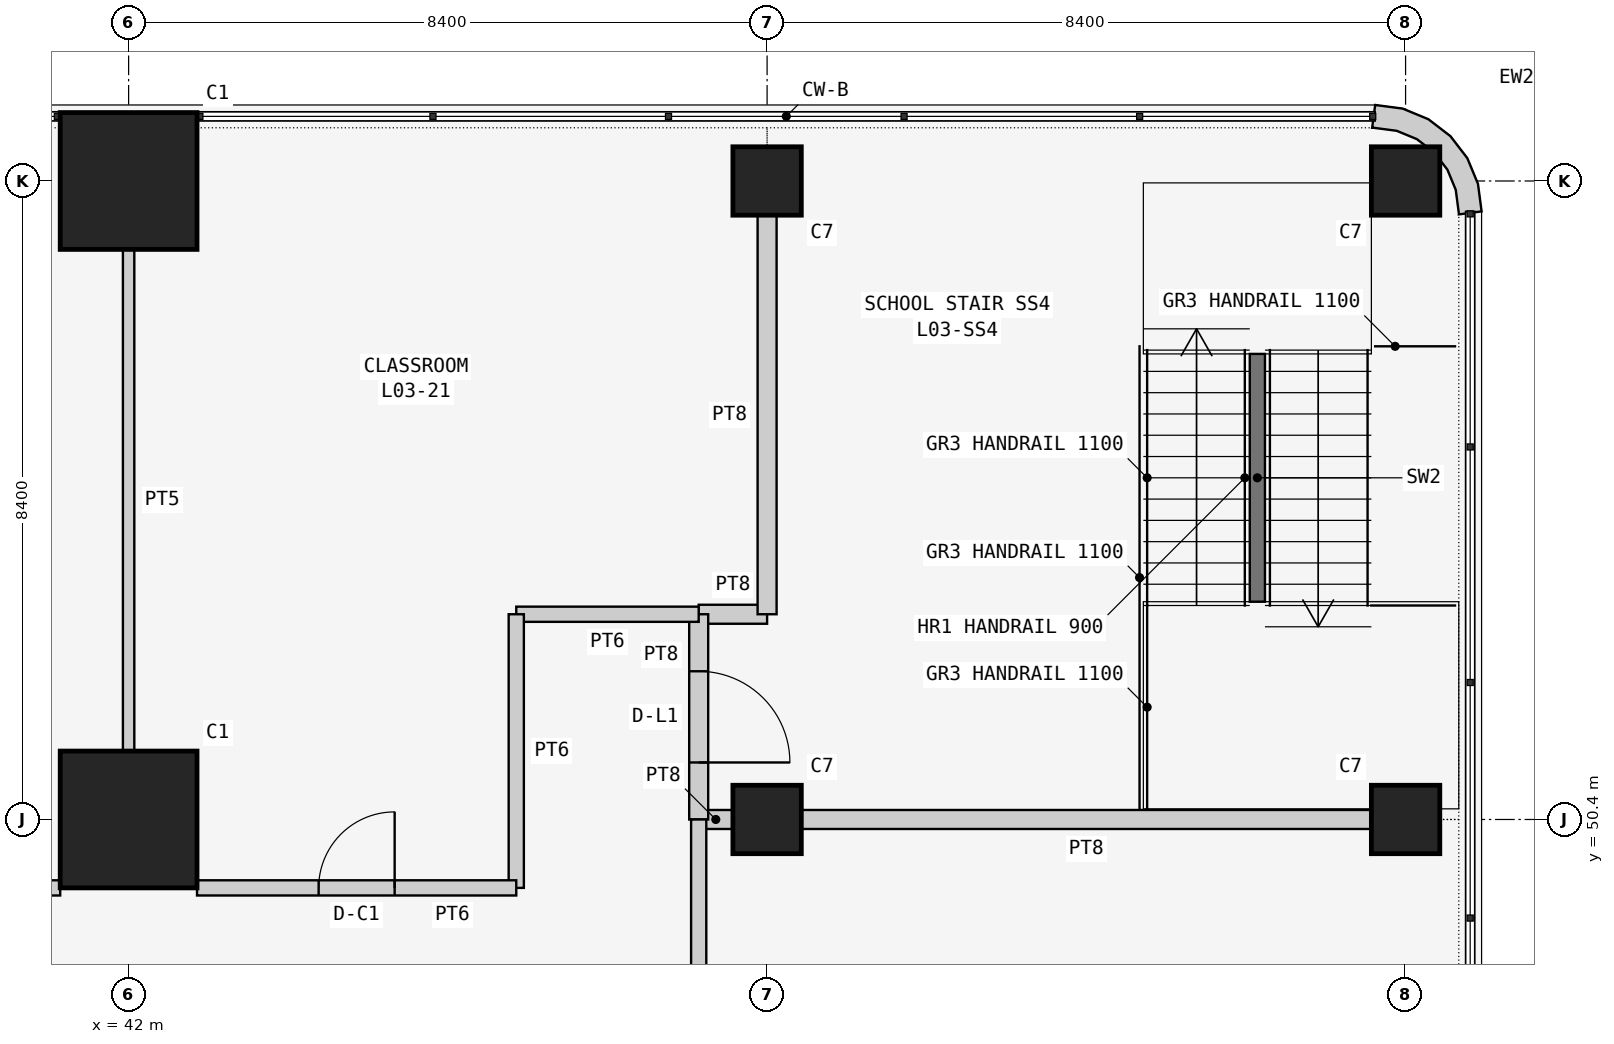
"""IFC4 building model, lengths in metres.
Left out: names, types, materials, properties, quantities, classifications, styles, units other than length and angle.
Written with IfcOpenShell. Run it as: python <this file> out.ifc"""

import sys

from ifc_helpers import new_model, si_unit, direction, frame, frame_2d, origin, origin_2d, place, context, subcontext, project, spatial, polyline, rectangle, outline, extrude, element, fill, save


model = new_model("IFC4")
c1 = context("Model", 3, precision=1e-05, world=origin(), true_north=direction((0.0, 1.0)))
c2 = subcontext(c1, "Body", "Model", "MODEL_VIEW")
j1 = project(units=[si_unit("LENGTHUNIT", "METRE"), si_unit("PLANEANGLEUNIT", "RADIAN")], contexts=[c1])
p1 = place(None, origin())
s1 = spatial("IfcSite", under=j1, at=p1, CompositionType="ELEMENT")
p2 = place(p1, origin())
s2 = spatial("IfcBuilding", under=s1, at=p2, CompositionType="ELEMENT")
p3 = place(p2, frame((0.0, 0.0, 15.0)))
s3 = spatial("IfcBuildingStorey", under=s2, at=p3, CompositionType="ELEMENT", Elevation=15.0)
for number, where, z_axis, x_axis in (
    (1, (42.0, 50.4, 0.0), (0.0, 0.0, 1.0), (1.0, 0.0, 0.0)),
    (2, (42.0, 58.8, 0.0), (0.0, 0.0, 1.0), (1.0, 0.0, 0.0)),
):
    element("IfcColumn", number, at=place(p3, frame(where, z_axis=z_axis, x_axis=x_axis)), inside=s3, PredefinedType="COLUMN", context=c2, shape_type="SweptSolid", body=[
        extrude(rectangle(XDim=1.8, YDim=1.8, at=origin_2d()), origin(), (0.0, 0.0, 1.0), 4.5),
    ])
for number, where, z_axis, x_axis in (
    (3, (50.4, 50.4, 0.0), (0.0, 0.0, 1.0), (1.0, 0.0, 0.0)),
    (4, (50.4, 58.8, 0.0), (0.0, 0.0, 1.0), (1.0, 0.0, 0.0)),
    (5, (58.8, 50.4, 0.0), (0.0, 0.0, 1.0), (1.0, 0.0, 0.0)),
    (6, (58.8, 58.8, 0.0), (0.0, 0.0, 1.0), (1.0, 0.0, 0.0)),
):
    element("IfcColumn", number, at=place(p3, frame(where, z_axis=z_axis, x_axis=x_axis)), inside=s3, PredefinedType="COLUMN", context=c2, shape_type="SweptSolid", body=[
        extrude(rectangle(XDim=0.9, YDim=0.9, at=origin_2d()), origin(), (0.0, 0.0, 1.0), 4.5),
    ])
p4 = place(p3, frame((59.648, 58.355, 0.0), z_axis=(0.0, 0.0, 1.0), x_axis=(0.707106781187, 0.707106781187, 0.0)))
e7 = element("IfcWall", 7, at=p4, inside=s3, PredefinedType="SOLIDWALL", context=c2, shape_type="SweptSolid", body=[
    extrude(outline(polyline([(0.139, 1.904), (-0.101, 1.72), (-0.087, 1.706), (0.1, 1.463), (0.209, 1.198), (0.246, 0.914), (0.209, 0.63), (0.1, 0.365), (-0.087, 0.122), (-0.101, 0.108), (0.139, -0.076), (0.362, 0.214), (0.502, 0.552), (0.549, 0.914), (0.502, 1.276), (0.362, 1.614), (0.139, 1.904)])), origin(), (0.0, 0.0, 1.0), 4.3),
])
p5 = place(p3, frame((49.95, 50.4, 0.0), z_axis=(0.0, 0.0, 1.0), x_axis=(-1.0, 0.0, 0.0)))
e8 = element("IfcWall", 8, at=p5, inside=s3, PredefinedType="SOLIDWALL", context=c2, shape_type="SweptSolid", body=[
    extrude(rectangle(XDim=0.45, YDim=0.25, at=frame_2d((0.225, 0.0))), origin(), (0.0, 0.0, 1.0), 3.543),
])
p6 = place(p3, frame((58.35, 50.4, 0.0), z_axis=(0.0, 0.0, 1.0), x_axis=(-1.0, 0.0, 0.0)))
e9 = element("IfcWall", 9, at=p6, inside=s3, PredefinedType="SOLIDWALL", context=c2, shape_type="SweptSolid", body=[
    extrude(rectangle(XDim=7.5, YDim=0.25, at=frame_2d((3.75, 0.0))), origin(), (0.0, 0.0, 1.0), 3.543),
])
p7 = place(p3, frame((49.5, 53.1, 0.0), z_axis=(0.0, 0.0, 1.0), x_axis=(1.0, 0.0, 0.0)))
e10 = element("IfcWall", 10, at=p7, inside=s3, PredefinedType="SOLIDWALL", context=c2, shape_type="SweptSolid", body=[
    extrude(rectangle(XDim=0.9, YDim=0.25, at=frame_2d((0.45, 0.0))), origin(), (0.0, 0.0, 1.0), 4.3),
])
p8 = place(p3, frame((50.4, 53.1, 0.0), z_axis=(0.0, 0.0, 1.0), x_axis=(0.0, 1.0, 0.0)))
e11 = element("IfcWall", 11, at=p8, inside=s3, PredefinedType="SOLIDWALL", context=c2, shape_type="SweptSolid", body=[
    extrude(rectangle(XDim=5.25, YDim=0.25, at=frame_2d((2.625, 0.0))), origin(), (0.0, 0.0, 1.0), 3.543),
])
p9 = place(p3, frame((49.5, 50.4, 0.0), z_axis=(0.0, 0.0, 1.0), x_axis=(0.0, 1.0, 0.0)))
e12 = element("IfcWall", 12, at=p9, inside=s3, PredefinedType="SOLIDWALL", context=c2, shape_type="SweptSolid", body=[
    extrude(rectangle(XDim=2.7, YDim=0.25, at=frame_2d((1.35, 0.0))), origin(), (0.0, 0.0, 1.0), 4.3),
])
p10 = place(p9, frame((0.75, 0.0, 0.0)))
e13 = element("IfcOpeningElement", 13, at=p10, cuts=e12, PredefinedType="OPENING", context=c2, shape_type="SweptSolid", body=[
    extrude(rectangle(XDim=1.2, YDim=2.1, at=frame_2d((0.6, 1.05))), frame((0.0, 0.135, 0.0), z_axis=(0.0, -1.0, 0.0), x_axis=(1.0, 0.0, 0.0)), (0.0, 0.0, 1.0), 0.27),
])
p11 = place(p3, frame((49.5, 42.9, 0.0), z_axis=(0.0, 0.0, 1.0), x_axis=(0.0, 1.0, 0.0)))
e14 = element("IfcWall", 14, at=p11, inside=s3, PredefinedType="PARTITIONING", context=c2, shape_type="SweptSolid", body=[
    extrude(rectangle(XDim=7.5, YDim=0.2, at=frame_2d((3.75, 0.0))), origin(), (0.0, 0.0, 1.0), 4.3),
])
p12 = place(p11, frame((3.25, 0.0, 0.0)))
e15 = element("IfcOpeningElement", 15, at=p12, cuts=e14, PredefinedType="OPENING", context=c2, shape_type="SweptSolid", body=[
    extrude(rectangle(XDim=1.0, YDim=2.1, at=frame_2d((0.5, 1.05))), frame((0.0, 0.11, 0.0), z_axis=(0.0, -1.0, 0.0), x_axis=(1.0, 0.0, 0.0)), (0.0, 0.0, 1.0), 0.22),
])
p13 = place(p3, frame((42.0, 57.9, 0.0), z_axis=(0.0, 0.0, 1.0), x_axis=(0.0, -1.0, 0.0)))
e16 = element("IfcWall", 16, at=p13, inside=s3, PredefinedType="PARTITIONING", context=c2, shape_type="SweptSolid", body=[
    extrude(rectangle(XDim=6.6, YDim=0.15, at=frame_2d((3.3, 0.0))), origin(), (0.0, 0.0, 1.0), 3.543),
])
p14 = place(p3, frame((41.1, 49.5, 0.0), z_axis=(0.0, 0.0, 1.0), x_axis=(-1.0, 0.0, 0.0)))
e17 = element("IfcWall", 17, at=p14, inside=s3, PredefinedType="PARTITIONING", context=c2, shape_type="SweptSolid", body=[
    extrude(rectangle(XDim=6.6, YDim=0.2, at=frame_2d((3.3, 0.0))), origin(), (0.0, 0.0, 1.0), 4.3),
])
p15 = place(p14, frame((2.8, 0.0, 0.0)))
e18 = element("IfcOpeningElement", 18, at=p15, cuts=e17, PredefinedType="OPENING", context=c2, shape_type="SweptSolid", body=[
    extrude(rectangle(XDim=1.0, YDim=2.1, at=frame_2d((0.5, 1.05))), frame((0.0, 0.11, 0.0), z_axis=(0.0, -1.0, 0.0), x_axis=(1.0, 0.0, 0.0)), (0.0, 0.0, 1.0), 0.22),
])
p16 = place(p3, frame((49.5, 53.1, 0.0), z_axis=(0.0, 0.0, 1.0), x_axis=(-1.0, 0.0, 0.0)))
e19 = element("IfcWall", 19, at=p16, inside=s3, PredefinedType="PARTITIONING", context=c2, shape_type="SweptSolid", body=[
    extrude(rectangle(XDim=2.4, YDim=0.2, at=frame_2d((1.2, 0.0))), origin(), (0.0, 0.0, 1.0), 4.3),
])
p17 = place(p3, frame((47.1, 53.1, 0.0), z_axis=(0.0, 0.0, 1.0), x_axis=(0.0, -1.0, 0.0)))
e20 = element("IfcWall", 20, at=p17, inside=s3, PredefinedType="PARTITIONING", context=c2, shape_type="SweptSolid", body=[
    extrude(rectangle(XDim=3.6, YDim=0.2, at=frame_2d((1.8, 0.0))), origin(), (0.0, 0.0, 1.0), 4.3),
])
p18 = place(p3, frame((47.1, 49.5, 0.0), z_axis=(0.0, 0.0, 1.0), x_axis=(-1.0, 0.0, 0.0)))
e21 = element("IfcWall", 21, at=p18, inside=s3, PredefinedType="PARTITIONING", context=c2, shape_type="SweptSolid", body=[
    extrude(rectangle(XDim=4.2, YDim=0.2, at=frame_2d((2.1, 0.0))), origin(), (0.0, 0.0, 1.0), 4.3),
])
p19 = place(p18, frame((1.6, 0.0, 0.0)))
e22 = element("IfcOpeningElement", 22, at=p19, cuts=e21, PredefinedType="OPENING", context=c2, shape_type="SweptSolid", body=[
    extrude(rectangle(XDim=1.0, YDim=2.1, at=frame_2d((0.5, 1.05))), frame((0.0, 0.11, 0.0), z_axis=(0.0, -1.0, 0.0), x_axis=(1.0, 0.0, 0.0)), (0.0, 0.0, 1.0), 0.22),
])
p20 = place(p3, frame((56.85, 56.525, 0.0), z_axis=(0.0, 0.0, 1.0), x_axis=(0.0, -1.0, 0.0)))
e23 = element("IfcWall", 23, at=p20, inside=s3, PredefinedType="SOLIDWALL", context=c2, shape_type="SweptSolid", body=[
    extrude(rectangle(XDim=3.26, YDim=0.2, at=frame_2d((1.63, 0.0))), origin(), (0.0, 0.0, 1.0), 4.5),
])
p21 = place(p10, frame((1.2, 0.0, 0.0), z_axis=(0.0, 0.0, 1.0), x_axis=(-1.0, 0.0, 0.0)))
e24 = element("IfcDoor", 24, at=p21, inside=s3, OperationType="SINGLE_SWING_RIGHT", PredefinedType="DOOR", context=c2, shape_type="SweptSolid", body=[
    extrude(rectangle(XDim=1.2, YDim=2.1, at=frame_2d((0.6, 1.05))), frame((0.0, 0.025, 0.0), z_axis=(0.0, -1.0, 0.0), x_axis=(1.0, 0.0, 0.0)), (0.0, 0.0, 1.0), 0.05),
])
fill(e13, e24)
p22 = place(p19, frame((1.0, 0.0, 0.0), z_axis=(0.0, 0.0, 1.0), x_axis=(-1.0, 0.0, 0.0)))
e25 = element("IfcDoor", 25, at=p22, inside=s3, OperationType="SINGLE_SWING_RIGHT", PredefinedType="DOOR", context=c2, shape_type="SweptSolid", body=[
    extrude(rectangle(XDim=1.0, YDim=2.1, at=frame_2d((0.5, 1.05))), frame((0.0, 0.025, 0.0), z_axis=(0.0, -1.0, 0.0), x_axis=(1.0, 0.0, 0.0)), (0.0, 0.0, 1.0), 0.05),
])
fill(e22, e25)
save(model, sys.argv[1])
